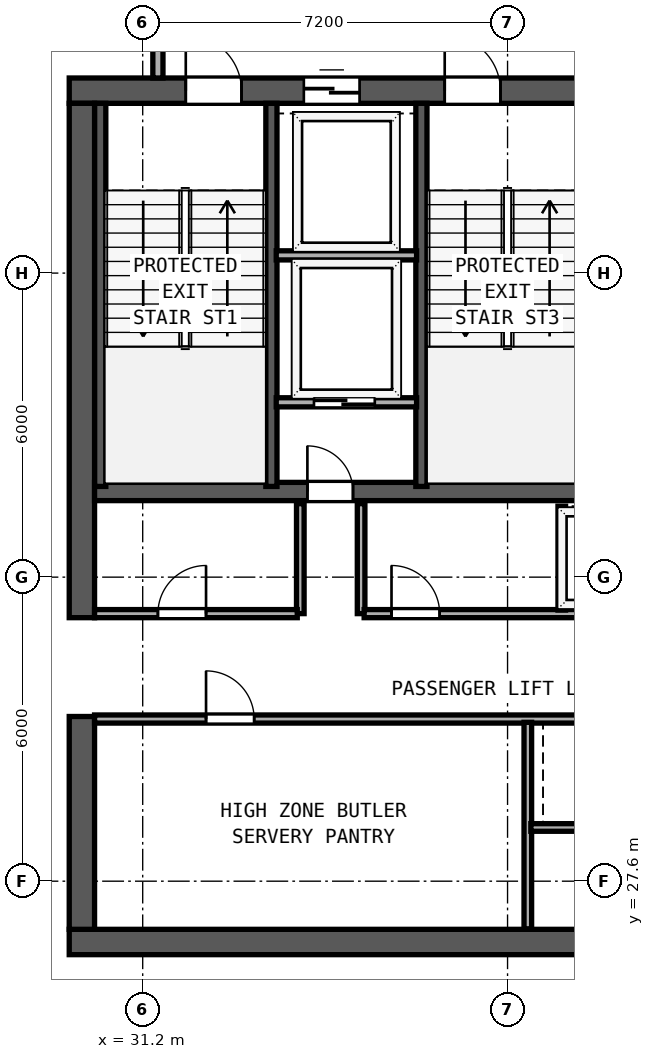
"""IFC4 building model, lengths in metres.
Left out: names, types, materials, properties, quantities, classifications, styles, units other than length and angle.
Written with IfcOpenShell. Run it as: python <this file> out.ifc"""

import sys

from ifc_helpers import new_model, si_unit, direction, frame, frame_2d, origin, place, context, subcontext, project, spatial, rectangle, extrude, element, fill, save


model = new_model("IFC4")
c1 = context("Model", 3, precision=1e-05, world=origin(), true_north=direction((0.0, 1.0)))
c2 = subcontext(c1, "Body", "Model", "MODEL_VIEW")
j1 = project(units=[si_unit("LENGTHUNIT", "METRE"), si_unit("PLANEANGLEUNIT", "RADIAN")], contexts=[c1])
p1 = place(None, origin())
s1 = spatial("IfcSite", under=j1, at=p1, CompositionType="ELEMENT")
p2 = place(p1, origin())
s2 = spatial("IfcBuilding", under=s1, at=p2, CompositionType="ELEMENT")
p3 = place(p2, frame((0.0, 0.0, 305.6)))
s3 = spatial("IfcBuildingStorey", under=s2, at=p3, CompositionType="ELEMENT", Elevation=305.6)
p4 = place(p3, frame((29.75, 26.4, 0.0), z_axis=(0.0, 0.0, 1.0), x_axis=(1.0, 0.0, 0.0)))
e1 = element("IfcWall", 1, at=p4, inside=s3, PredefinedType="SHEAR", context=c2, shape_type="SweptSolid", body=[
    extrude(rectangle(XDim=17.3, YDim=0.5, at=frame_2d((8.65, 0.0))), origin(), (0.0, 0.0, 1.0), 3.72),
])
p5 = place(p3, frame((29.75, 43.2, 0.0), z_axis=(0.0, 0.0, 1.0), x_axis=(1.0, 0.0, 0.0)))
e2 = element("IfcWall", 2, at=p5, inside=s3, PredefinedType="SHEAR", context=c2, shape_type="SweptSolid", body=[
    extrude(rectangle(XDim=17.3, YDim=0.5, at=frame_2d((8.65, 0.0))), origin(), (0.0, 0.0, 1.0), 3.72),
])
p6 = place(p5, frame((2.3, 0.0, 0.0)))
e3 = element("IfcOpeningElement", 3, at=p6, cuts=e2, PredefinedType="OPENING", context=c2, shape_type="SweptSolid", body=[
    extrude(rectangle(XDim=1.1, YDim=2.15, at=frame_2d((0.55, 1.075))), frame((0.0, 0.26, 0.0), z_axis=(0.0, -1.0, 0.0), x_axis=(1.0, 0.0, 0.0)), (0.0, 0.0, 1.0), 0.52),
])
p7 = place(p5, frame((7.41, 0.0, 0.0)))
e4 = element("IfcOpeningElement", 4, at=p7, cuts=e2, PredefinedType="OPENING", context=c2, shape_type="SweptSolid", body=[
    extrude(rectangle(XDim=1.1, YDim=2.15, at=frame_2d((0.55, 1.075))), frame((0.0, 0.26, 0.0), z_axis=(0.0, -1.0, 0.0), x_axis=(1.0, 0.0, 0.0)), (0.0, 0.0, 1.0), 0.52),
])
p8 = place(p5, frame((13.5, 0.0, 0.0)))
e5 = element("IfcOpeningElement", 5, at=p8, cuts=e2, PredefinedType="OPENING", context=c2, shape_type="SweptSolid", body=[
    extrude(rectangle(XDim=1.1, YDim=2.15, at=frame_2d((0.55, 1.075))), frame((0.0, 0.26, 0.0), z_axis=(0.0, -1.0, 0.0), x_axis=(1.0, 0.0, 0.0)), (0.0, 0.0, 1.0), 0.52),
])
p9 = place(p5, frame((4.63, 0.0, 0.0)))
e6 = element("IfcOpeningElement", 6, at=p9, cuts=e2, PredefinedType="OPENING", context=c2, shape_type="SweptSolid", body=[
    extrude(rectangle(XDim=1.1, YDim=2.2, at=frame_2d((0.55, 1.1))), frame((0.0, 0.26, 0.0), z_axis=(0.0, -1.0, 0.0), x_axis=(1.0, 0.0, 0.0)), (0.0, 0.0, 1.0), 0.52),
])
p10 = place(p5, frame((10.99, 0.0, 0.0)))
e7 = element("IfcOpeningElement", 7, at=p10, cuts=e2, PredefinedType="OPENING", context=c2, shape_type="SweptSolid", body=[
    extrude(rectangle(XDim=1.1, YDim=2.2, at=frame_2d((0.55, 1.1))), frame((0.0, 0.26, 0.0), z_axis=(0.0, -1.0, 0.0), x_axis=(1.0, 0.0, 0.0)), (0.0, 0.0, 1.0), 0.52),
])
p11 = place(p3, frame((30.0, 26.65, 0.0), z_axis=(0.0, 0.0, 1.0), x_axis=(0.0, 1.0, 0.0)))
e8 = element("IfcWall", 8, at=p11, inside=s3, PredefinedType="SHEAR", context=c2, shape_type="SweptSolid", body=[
    extrude(rectangle(XDim=4.2, YDim=0.5, at=frame_2d((2.1, 0.0))), origin(), (0.0, 0.0, 1.0), 3.72),
])
p12 = place(p3, frame((30.0, 32.8, 0.0), z_axis=(0.0, 0.0, 1.0), x_axis=(0.0, 1.0, 0.0)))
e9 = element("IfcWall", 9, at=p12, inside=s3, PredefinedType="SHEAR", context=c2, shape_type="SweptSolid", body=[
    extrude(rectangle(XDim=10.15, YDim=0.5, at=frame_2d((5.075, 0.0))), origin(), (0.0, 0.0, 1.0), 3.72),
])
p13 = place(p3, frame((30.25, 35.29, 0.0), z_axis=(0.0, 0.0, 1.0), x_axis=(1.0, 0.0, 0.0)))
e10 = element("IfcWall", 10, at=p13, inside=s3, PredefinedType="SHEAR", context=c2, shape_type="SweptSolid", body=[
    extrude(rectangle(XDim=16.3, YDim=0.36, at=frame_2d((8.15, 0.0))), origin(), (0.0, 0.0, 1.0), 3.72),
])
p14 = place(p13, frame((5.1, 0.0, 0.0), z_axis=(0.0, 0.0, 1.0), x_axis=(-1.0, 0.0, 0.0)))
e11 = element("IfcOpeningElement", 11, at=p14, cuts=e10, PredefinedType="OPENING", context=c2, shape_type="SweptSolid", body=[
    extrude(rectangle(XDim=0.9, YDim=2.1, at=frame_2d((0.45, 1.05))), frame((0.0, 0.19, 0.0), z_axis=(0.0, -1.0, 0.0), x_axis=(1.0, 0.0, 0.0)), (0.0, 0.0, 1.0), 0.38),
])
p15 = place(p13, frame((12.16, 0.0, 0.0), z_axis=(0.0, 0.0, 1.0), x_axis=(-1.0, 0.0, 0.0)))
e12 = element("IfcOpeningElement", 12, at=p15, cuts=e10, PredefinedType="OPENING", context=c2, shape_type="SweptSolid", body=[
    extrude(rectangle(XDim=0.9, YDim=2.1, at=frame_2d((0.45, 1.05))), frame((0.0, 0.19, 0.0), z_axis=(0.0, -1.0, 0.0), x_axis=(1.0, 0.0, 0.0)), (0.0, 0.0, 1.0), 0.38),
])
for number, where, z_axis, x_axis in (
    (13, (30.362, 35.39, 0.0), (0.0, 0.0, 1.0), (0.0, 1.0, 0.0)),
    (14, (33.74, 35.39, 0.0), (0.0, 0.0, 1.0), (0.0, 1.0, 0.0)),
    (15, (36.7, 35.39, 0.0), (0.0, 0.0, 1.0), (0.0, 1.0, 0.0)),
):
    element("IfcWall", number, at=place(p3, frame(where, z_axis=z_axis, x_axis=x_axis)), inside=s3, PredefinedType="SHEAR", context=c2, shape_type="SweptSolid", body=[
        extrude(rectangle(XDim=7.56, YDim=0.22, at=frame_2d((3.78, 0.0))), origin(), (0.0, 0.0, 1.0), 3.72),
    ])
p16 = place(p3, frame((31.5, 43.45, 0.0), z_axis=(0.0, 0.0, 1.0), x_axis=(0.0, 1.0, 0.0)))
e16 = element("IfcWall", 16, at=p16, inside=s3, PredefinedType="SOLIDWALL", context=c2, shape_type="SweptSolid", body=[
    extrude(rectangle(XDim=2.445, YDim=0.2, at=frame_2d((1.223, 0.0))), origin(), (0.0, 0.0, 1.0), 3.72),
])
p17 = place(p16, frame((1.8, 0.0, 0.0), z_axis=(0.0, 0.0, 1.0), x_axis=(-1.0, 0.0, 0.0)))
e17 = element("IfcOpeningElement", 17, at=p17, cuts=e16, PredefinedType="OPENING", context=c2, shape_type="SweptSolid", body=[
    extrude(rectangle(XDim=1.1, YDim=2.15, at=frame_2d((0.55, 1.075))), frame((0.0, 0.11, 0.0), z_axis=(0.0, -1.0, 0.0), x_axis=(1.0, 0.0, 0.0)), (0.0, 0.0, 1.0), 0.22),
])
p18 = place(p3, frame((33.835, 39.95, 0.0), z_axis=(0.0, 0.0, 1.0), x_axis=(1.0, 0.0, 0.0)))
e18 = element("IfcWall", 18, at=p18, inside=s3, PredefinedType="SOLIDWALL", context=c2, shape_type="SweptSolid", body=[
    extrude(rectangle(XDim=2.77, YDim=0.18, at=frame_2d((1.385, 0.0))), origin(), (0.0, 0.0, 1.0), 3.72),
])
p19 = place(p3, frame((33.835, 37.05, 0.0), z_axis=(0.0, 0.0, 1.0), x_axis=(1.0, 0.0, 0.0)))
e19 = element("IfcWall", 19, at=p19, inside=s3, PredefinedType="SOLIDWALL", context=c2, shape_type="SweptSolid", body=[
    extrude(rectangle(XDim=2.77, YDim=0.18, at=frame_2d((1.385, 0.0))), origin(), (0.0, 0.0, 1.0), 3.72),
])
p20 = place(p19, frame((1.945, 0.0, 0.0), z_axis=(0.0, 0.0, 1.0), x_axis=(-1.0, 0.0, 0.0)))
e20 = element("IfcOpeningElement", 20, at=p20, cuts=e19, PredefinedType="OPENING", context=c2, shape_type="SweptSolid", body=[
    extrude(rectangle(XDim=1.2, YDim=2.2, at=frame_2d((0.6, 1.1))), frame((0.0, 0.1, 0.0), z_axis=(0.0, -1.0, 0.0), x_axis=(1.0, 0.0, 0.0)), (0.0, 0.0, 1.0), 0.2),
])
for number, where, z_axis, x_axis in (
    (21, (34.31, 32.88, 0.0), (0.0, 0.0, 1.0), (0.0, 1.0, 0.0)),
    (22, (35.51, 32.88, 0.0), (0.0, 0.0, 1.0), (0.0, 1.0, 0.0)),
):
    element("IfcWall", number, at=place(p3, frame(where, z_axis=z_axis, x_axis=x_axis)), inside=s3, PredefinedType="SOLIDWALL", context=c2, shape_type="SweptSolid", body=[
        extrude(rectangle(XDim=2.17, YDim=0.15, at=frame_2d((1.085, 0.0))), origin(), (0.0, 0.0, 1.0), 3.72),
    ])
p21 = place(p3, frame((30.25, 32.88, 0.0), z_axis=(0.0, 0.0, 1.0), x_axis=(1.0, 0.0, 0.0)))
e23 = element("IfcWall", 23, at=p21, inside=s3, PredefinedType="SOLIDWALL", context=c2, shape_type="SweptSolid", body=[
    extrude(rectangle(XDim=4.0, YDim=0.16, at=frame_2d((2.0, 0.0))), origin(), (0.0, 0.0, 1.0), 3.72),
])
p22 = place(p21, frame((2.2, 0.0, 0.0), z_axis=(0.0, 0.0, 1.0), x_axis=(-1.0, 0.0, 0.0)))
e24 = element("IfcOpeningElement", 24, at=p22, cuts=e23, PredefinedType="OPENING", context=c2, shape_type="SweptSolid", body=[
    extrude(rectangle(XDim=0.95, YDim=2.12, at=frame_2d((0.475, 1.06))), frame((0.0, 0.09, 0.0), z_axis=(0.0, -1.0, 0.0), x_axis=(1.0, 0.0, 0.0)), (0.0, 0.0, 1.0), 0.18),
])
p23 = place(p3, frame((35.57, 32.88, 0.0), z_axis=(0.0, 0.0, 1.0), x_axis=(1.0, 0.0, 0.0)))
e25 = element("IfcWall", 25, at=p23, inside=s3, PredefinedType="SOLIDWALL", context=c2, shape_type="SweptSolid", body=[
    extrude(rectangle(XDim=5.74, YDim=0.16, at=frame_2d((2.87, 0.0))), origin(), (0.0, 0.0, 1.0), 3.72),
])
p24 = place(p23, frame((1.49, 0.0, 0.0), z_axis=(0.0, 0.0, 1.0), x_axis=(-1.0, 0.0, 0.0)))
e26 = element("IfcOpeningElement", 26, at=p24, cuts=e25, PredefinedType="OPENING", context=c2, shape_type="SweptSolid", body=[
    extrude(rectangle(XDim=0.95, YDim=2.12, at=frame_2d((0.475, 1.06))), frame((0.0, 0.09, 0.0), z_axis=(0.0, -1.0, 0.0), x_axis=(1.0, 0.0, 0.0)), (0.0, 0.0, 1.0), 0.18),
])
p25 = place(p23, frame((5.43, 0.0, 0.0), z_axis=(0.0, 0.0, 1.0), x_axis=(-1.0, 0.0, 0.0)))
e27 = element("IfcOpeningElement", 27, at=p25, cuts=e25, PredefinedType="OPENING", context=c2, shape_type="SweptSolid", body=[
    extrude(rectangle(XDim=1.1, YDim=2.2, at=frame_2d((0.55, 1.1))), frame((0.0, 0.09, 0.0), z_axis=(0.0, -1.0, 0.0), x_axis=(1.0, 0.0, 0.0)), (0.0, 0.0, 1.0), 0.18),
])
p26 = place(p3, frame((39.47, 32.95, 0.0), z_axis=(0.0, 0.0, 1.0), x_axis=(0.0, 1.0, 0.0)))
e28 = element("IfcWall", 28, at=p26, inside=s3, PredefinedType="SOLIDWALL", context=c2, shape_type="SweptSolid", body=[
    extrude(rectangle(XDim=2.05, YDim=0.15, at=frame_2d((1.025, 0.0))), origin(), (0.0, 0.0, 1.0), 3.72),
])
p27 = place(p3, frame((30.25, 30.8, 0.0), z_axis=(0.0, 0.0, 1.0), x_axis=(1.0, 0.0, 0.0)))
e29 = element("IfcWall", 29, at=p27, inside=s3, PredefinedType="SOLIDWALL", context=c2, shape_type="SweptSolid", body=[
    extrude(rectangle(XDim=16.3, YDim=0.16, at=frame_2d((8.15, 0.0))), origin(), (0.0, 0.0, 1.0), 3.72),
])
p28 = place(p27, frame((2.2, 0.0, 0.0)))
e30 = element("IfcOpeningElement", 30, at=p28, cuts=e29, PredefinedType="OPENING", context=c2, shape_type="SweptSolid", body=[
    extrude(rectangle(XDim=0.95, YDim=2.12, at=frame_2d((0.475, 1.06))), frame((0.0, 0.09, 0.0), z_axis=(0.0, -1.0, 0.0), x_axis=(1.0, 0.0, 0.0)), (0.0, 0.0, 1.0), 0.18),
])
p29 = place(p3, frame((38.8, 26.66, 0.0), z_axis=(0.0, 0.0, 1.0), x_axis=(0.0, 1.0, 0.0)))
e31 = element("IfcWall", 31, at=p29, inside=s3, PredefinedType="SOLIDWALL", context=c2, shape_type="SweptSolid", body=[
    extrude(rectangle(XDim=4.075, YDim=0.15, at=frame_2d((2.038, 0.0))), origin(), (0.0, 0.0, 1.0), 3.72),
])
p30 = place(p3, frame((38.86, 28.66, 0.0), z_axis=(0.0, 0.0, 1.0), x_axis=(1.0, 0.0, 0.0)))
e32 = element("IfcWall", 32, at=p30, inside=s3, PredefinedType="PARTITIONING", context=c2, shape_type="SweptSolid", body=[
    extrude(rectangle(XDim=7.69, YDim=0.15, at=frame_2d((3.845, 0.0))), origin(), (0.0, 0.0, 1.0), 3.72),
])
p31 = place(p6, origin())
e33 = element("IfcDoor", 33, at=p31, inside=s3, OperationType="SINGLE_SWING_LEFT", PredefinedType="DOOR", context=c2, shape_type="SweptSolid", body=[
    extrude(rectangle(XDim=1.1, YDim=2.15, at=frame_2d((0.55, 1.075))), frame((0.0, 0.185, 0.0), z_axis=(0.0, -1.0, 0.0), x_axis=(1.0, 0.0, 0.0)), (0.0, 0.0, 1.0), 0.05),
])
fill(e3, e33)
p32 = place(p7, origin())
e34 = element("IfcDoor", 34, at=p32, inside=s3, OperationType="SINGLE_SWING_LEFT", PredefinedType="DOOR", context=c2, shape_type="SweptSolid", body=[
    extrude(rectangle(XDim=1.1, YDim=2.15, at=frame_2d((0.55, 1.075))), frame((0.0, 0.185, 0.0), z_axis=(0.0, -1.0, 0.0), x_axis=(1.0, 0.0, 0.0)), (0.0, 0.0, 1.0), 0.05),
])
fill(e4, e34)
p33 = place(p9, origin())
e35 = element("IfcDoor", 35, at=p33, inside=s3, OperationType="SLIDING_TO_LEFT", PredefinedType="DOOR", context=c2, shape_type="SweptSolid", body=[
    extrude(rectangle(XDim=1.1, YDim=2.2, at=frame_2d((0.55, 1.1))), frame((0.0, 0.185, 0.0), z_axis=(0.0, -1.0, 0.0), x_axis=(1.0, 0.0, 0.0)), (0.0, 0.0, 1.0), 0.05),
])
fill(e6, e35)
p34 = place(p20, origin())
e36 = element("IfcDoor", 36, at=p34, inside=s3, OperationType="SLIDING_TO_RIGHT", PredefinedType="DOOR", context=c2, shape_type="SweptSolid", body=[
    extrude(rectangle(XDim=1.2, YDim=2.2, at=frame_2d((0.6, 1.1))), frame((0.0, 0.025, 0.0), z_axis=(0.0, -1.0, 0.0), x_axis=(1.0, 0.0, 0.0)), (0.0, 0.0, 1.0), 0.05),
])
fill(e20, e36)
p35 = place(p14, origin())
e37 = element("IfcDoor", 37, at=p35, inside=s3, OperationType="SINGLE_SWING_RIGHT", PredefinedType="DOOR", context=c2, shape_type="SweptSolid", body=[
    extrude(rectangle(XDim=0.9, YDim=2.1, at=frame_2d((0.45, 1.05))), frame((0.0, 0.025, 0.0), z_axis=(0.0, -1.0, 0.0), x_axis=(1.0, 0.0, 0.0)), (0.0, 0.0, 1.0), 0.05),
])
fill(e11, e37)
p36 = place(p22, origin())
e38 = element("IfcDoor", 38, at=p36, inside=s3, OperationType="SINGLE_SWING_LEFT", PredefinedType="DOOR", context=c2, shape_type="SweptSolid", body=[
    extrude(rectangle(XDim=0.95, YDim=2.12, at=frame_2d((0.475, 1.06))), frame((0.0, 0.025, 0.0), z_axis=(0.0, -1.0, 0.0), x_axis=(1.0, 0.0, 0.0)), (0.0, 0.0, 1.0), 0.05),
])
fill(e24, e38)
p37 = place(p24, origin())
e39 = element("IfcDoor", 39, at=p37, inside=s3, OperationType="SINGLE_SWING_RIGHT", PredefinedType="DOOR", context=c2, shape_type="SweptSolid", body=[
    extrude(rectangle(XDim=0.95, YDim=2.12, at=frame_2d((0.475, 1.06))), frame((0.0, 0.025, 0.0), z_axis=(0.0, -1.0, 0.0), x_axis=(1.0, 0.0, 0.0)), (0.0, 0.0, 1.0), 0.05),
])
fill(e26, e39)
p38 = place(p28, origin())
e40 = element("IfcDoor", 40, at=p38, inside=s3, OperationType="SINGLE_SWING_LEFT", PredefinedType="DOOR", context=c2, shape_type="SweptSolid", body=[
    extrude(rectangle(XDim=0.95, YDim=2.12, at=frame_2d((0.475, 1.06))), frame((0.0, 0.025, 0.0), z_axis=(0.0, -1.0, 0.0), x_axis=(1.0, 0.0, 0.0)), (0.0, 0.0, 1.0), 0.05),
])
fill(e30, e40)
save(model, sys.argv[1])
